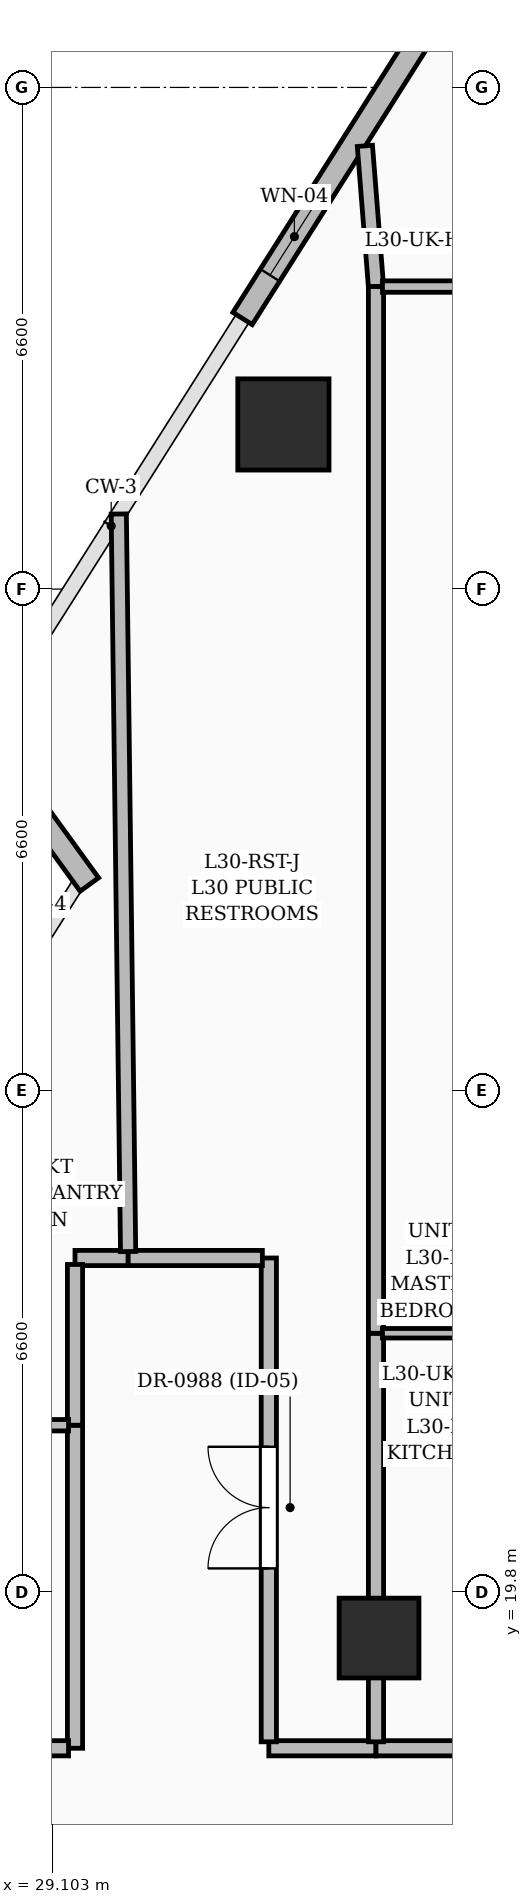
"""IFC4 building model, lengths in metres.
Left out: names, types, materials, properties, quantities, classifications, styles, units other than length and angle.
Written with IfcOpenShell. Run it as: python <this file> out.ifc"""

import sys

from ifc_helpers import new_model, si_unit, direction, frame, frame_2d, origin, origin_2d, place, context, subcontext, project, spatial, rectangle, extrude, element, fill, save


model = new_model("IFC4")
c1 = context("Model", 3, precision=1e-05, world=origin(), true_north=direction((0.0, 1.0)))
c2 = subcontext(c1, "Body", "Model", "MODEL_VIEW")
j1 = project(units=[si_unit("LENGTHUNIT", "METRE"), si_unit("PLANEANGLEUNIT", "RADIAN")], contexts=[c1])
p1 = place(None, origin())
s1 = spatial("IfcSite", under=j1, at=p1, CompositionType="ELEMENT")
p2 = place(p1, origin())
s2 = spatial("IfcBuilding", under=s1, at=p2, CompositionType="ELEMENT")
p3 = place(p2, frame((0.0, 0.0, 121.2)))
s3 = spatial("IfcBuildingStorey", under=s2, at=p3, CompositionType="ELEMENT", Elevation=121.2)
p4 = place(p3, frame((33.4, 19.2, 0.0), z_axis=(0.0, 0.0, 1.0), x_axis=(1.0, 0.0, 0.0)))
e1 = element("IfcColumn", 1, at=p4, inside=s3, PredefinedType="COLUMN", context=c2, shape_type="SweptSolid", body=[
    extrude(rectangle(XDim=1.05, YDim=1.05, at=origin_2d()), origin(), (0.0, 0.0, 1.0), 3.6),
])
p5 = place(p3, frame((32.142, 35.166, 0.0), z_axis=(0.0, 0.0, 1.0), x_axis=(1.0, 0.0, 0.0)))
e2 = element("IfcColumn", 2, at=p5, inside=s3, PredefinedType="COLUMN", context=c2, shape_type="SweptSolid", body=[
    extrude(rectangle(XDim=1.2, YDim=1.2, at=origin_2d()), origin(), (0.0, 0.0, 1.0), 3.6),
])
p6 = place(p3, frame((29.589, 29.114, 0.0), z_axis=(0.0, 0.0, 1.0), x_axis=(-0.587214315037, 0.809431496926, 0.0)))
e3 = element("IfcWall", 3, at=p6, inside=s3, PredefinedType="SOLIDWALL", context=c2, shape_type="SweptSolid", body=[
    extrude(rectangle(XDim=2.594, YDim=0.3, at=frame_2d((1.297, 0.0))), origin(), (0.0, 0.0, 1.0), 2.575),
])
p7 = place(p3, frame((31.604, 36.56, 0.0), z_axis=(0.0, 0.0, 1.0), x_axis=(0.53489387979, 0.844919249019, 0.0)))
e4 = element("IfcWall", 4, at=p7, inside=s3, PredefinedType="SOLIDWALL", context=c2, shape_type="SweptSolid", body=[
    extrude(rectangle(XDim=6.462, YDim=0.3, at=frame_2d((3.231, 0.0))), origin(), (0.0, 0.0, 1.0), 3.35),
])
p8 = place(p7, frame((0.675, 0.0, 0.8)))
e5 = element("IfcOpeningElement", 5, at=p8, cuts=e4, PredefinedType="OPENING", context=c2, shape_type="SweptSolid", body=[
    extrude(rectangle(XDim=1.2, YDim=1.8, at=frame_2d((0.6, 0.9))), frame((0.0, 0.16, 0.0), z_axis=(0.0, -1.0, 0.0), x_axis=(1.0, 0.0, 0.0)), (0.0, 0.0, 1.0), 0.32),
])
p9 = place(p3, frame((29.4, 22.0, 0.0), z_axis=(0.0, 0.0, 1.0), x_axis=(0.0, -1.0, 0.0)))
e6 = element("IfcWall", 6, at=p9, inside=s3, PredefinedType="PARTITIONING", context=c2, shape_type="SweptSolid", body=[
    extrude(rectangle(XDim=4.25, YDim=0.2, at=frame_2d((2.125, 0.0))), origin(), (0.0, 0.0, 1.0), 2.787),
])
p10 = place(p3, frame((29.315, 17.75, 0.0), z_axis=(0.0, 0.0, 1.0), x_axis=(-1.0, 0.0, 0.0)))
e7 = element("IfcWall", 7, at=p10, inside=s3, PredefinedType="PARTITIONING", context=c2, shape_type="SweptSolid", body=[
    extrude(rectangle(XDim=3.645, YDim=0.2, at=frame_2d((1.823, 0.0))), origin(), (0.0, 0.0, 1.0), 2.787),
])
p11 = place(p3, frame((30.1, 24.2, 0.0), z_axis=(0.0, 0.0, 1.0), x_axis=(-1.0, 0.0, 0.0)))
e8 = element("IfcWall", 8, at=p11, inside=s3, PredefinedType="PARTITIONING", context=c2, shape_type="SweptSolid", body=[
    extrude(rectangle(XDim=0.7, YDim=0.2, at=frame_2d((0.35, 0.0))), origin(), (0.0, 0.0, 1.0), 3.35),
])
p12 = place(p3, frame((29.4, 24.115, 0.0), z_axis=(0.0, 0.0, 1.0), x_axis=(0.0, -1.0, 0.0)))
e9 = element("IfcWall", 9, at=p12, inside=s3, PredefinedType="PARTITIONING", context=c2, shape_type="SweptSolid", body=[
    extrude(rectangle(XDim=2.115, YDim=0.2, at=frame_2d((1.058, 0.0))), origin(), (0.0, 0.0, 1.0), 2.372),
])
p13 = place(p3, frame((33.36, 17.75, 0.0), z_axis=(0.0, 0.0, 1.0), x_axis=(-1.0, 0.0, 0.0)))
e10 = element("IfcWall", 10, at=p13, inside=s3, PredefinedType="PARTITIONING", context=c2, shape_type="SweptSolid", body=[
    extrude(rectangle(XDim=1.41, YDim=0.2, at=frame_2d((0.705, 0.0))), origin(), (0.0, 0.0, 1.0), 3.35),
])
p14 = place(p3, frame((31.95, 17.835, 0.0), z_axis=(0.0, 0.0, 1.0), x_axis=(0.0, 1.0, 0.0)))
e11 = element("IfcWall", 11, at=p14, inside=s3, PredefinedType="PARTITIONING", context=c2, shape_type="SweptSolid", body=[
    extrude(rectangle(XDim=6.365, YDim=0.2, at=frame_2d((3.183, 0.0))), origin(), (0.0, 0.0, 1.0), 2.372),
])
p15 = place(p14, frame((2.281, 0.0, 0.0)))
e12 = element("IfcOpeningElement", 12, at=p15, cuts=e11, PredefinedType="OPENING", context=c2, shape_type="SweptSolid", body=[
    extrude(rectangle(XDim=1.6, YDim=2.3, at=frame_2d((0.8, 1.15))), frame((0.0, 0.11, 0.0), z_axis=(0.0, -1.0, 0.0), x_axis=(1.0, 0.0, 0.0)), (0.0, 0.0, 1.0), 0.22),
])
p16 = place(p3, frame((31.865, 24.2, 0.0), z_axis=(0.0, 0.0, 1.0), x_axis=(-1.0, 0.0, 0.0)))
e13 = element("IfcWall", 13, at=p16, inside=s3, PredefinedType="PARTITIONING", context=c2, shape_type="SweptSolid", body=[
    extrude(rectangle(XDim=1.765, YDim=0.2, at=frame_2d((0.882, 0.0))), origin(), (0.0, 0.0, 1.0), 2.787),
])
p17 = place(p3, frame((35.01, 17.75, 0.0), z_axis=(0.0, 0.0, 1.0), x_axis=(-1.0, 0.0, 0.0)))
e14 = element("IfcWall", 14, at=p17, inside=s3, PredefinedType="PARTITIONING", context=c2, shape_type="SweptSolid", body=[
    extrude(rectangle(XDim=1.65, YDim=0.2, at=frame_2d((0.825, 0.0))), origin(), (0.0, 0.0, 1.0), 2.436),
])
p18 = place(p3, frame((29.315, 22.0, 0.0), z_axis=(0.0, 0.0, 1.0), x_axis=(-1.0, 0.0, 0.0)))
e15 = element("IfcWall", 15, at=p18, inside=s3, PredefinedType="PARTITIONING", context=c2, shape_type="SweptSolid", body=[
    extrude(rectangle(XDim=3.585, YDim=0.15, at=frame_2d((1.792, 0.0))), origin(), (0.0, 0.0, 1.0), 2.787),
])
p19 = place(p3, frame((30.099, 24.285, 0.0), z_axis=(0.0, 0.0, 1.0), x_axis=(-0.012654984929, 0.999919922472, 0.0)))
e16 = element("IfcWall", 16, at=p19, inside=s3, PredefinedType="PARTITIONING", context=c2, shape_type="SweptSolid", body=[
    extrude(rectangle(XDim=9.704, YDim=0.2, at=frame_2d((4.852, 0.0))), origin(), (0.0, 0.0, 1.0), 2.57),
])
p20 = place(p3, frame((33.36, 36.98, 0.0), z_axis=(0.0, 0.0, 1.0), x_axis=(-0.07862683496, 0.99690411817, 0.0)))
e17 = element("IfcWall", 17, at=p20, inside=s3, PredefinedType="PARTITIONING", context=c2, shape_type="SweptSolid", body=[
    extrude(rectangle(XDim=1.857, YDim=0.2, at=frame_2d((0.928, 0.0))), origin(), (0.0, 0.0, 1.0), 3.35),
])
p21 = place(p3, frame((33.36, 17.835, 0.0), z_axis=(0.0, 0.0, 1.0), x_axis=(0.0, 1.0, 0.0)))
e18 = element("IfcWall", 18, at=p21, inside=s3, PredefinedType="PARTITIONING", context=c2, shape_type="SweptSolid", body=[
    extrude(rectangle(XDim=5.375, YDim=0.2, at=frame_2d((2.688, 0.0))), origin(), (0.0, 0.0, 1.0), 2.436),
])
p22 = place(p3, frame((33.36, 23.21, 0.0), z_axis=(0.0, 0.0, 1.0), x_axis=(0.0, 1.0, 0.0)))
e19 = element("IfcWall", 19, at=p22, inside=s3, PredefinedType="PARTITIONING", context=c2, shape_type="SweptSolid", body=[
    extrude(rectangle(XDim=13.77, YDim=0.2, at=frame_2d((6.885, 0.0))), origin(), (0.0, 0.0, 1.0), 2.372),
])
p23 = place(p3, frame((33.445, 36.98, 0.0), z_axis=(0.0, 0.0, 1.0), x_axis=(1.0, 0.0, 0.0)))
e20 = element("IfcWall", 20, at=p23, inside=s3, PredefinedType="PARTITIONING", context=c2, shape_type="SweptSolid", body=[
    extrude(rectangle(XDim=1.505, YDim=0.15, at=frame_2d((0.752, 0.0))), origin(), (0.0, 0.0, 1.0), 3.35),
])
p24 = place(p3, frame((34.962, 23.21, 0.0), z_axis=(0.0, 0.0, 1.0), x_axis=(-1.0, 0.0, 0.0)))
e21 = element("IfcWall", 21, at=p24, inside=s3, PredefinedType="PARTITIONING", context=c2, shape_type="SweptSolid", body=[
    extrude(rectangle(XDim=1.517, YDim=0.125, at=frame_2d((0.759, 0.0))), origin(), (0.0, 0.0, 1.0), 3.35),
])
p25 = place(p8, origin())
e22 = element("IfcWindow", 22, at=p25, inside=s3, PartitioningType="SINGLE_PANEL", PredefinedType="WINDOW", context=c2, shape_type="SweptSolid", body=[
    extrude(rectangle(XDim=1.2, YDim=1.8, at=frame_2d((0.6, 0.9))), frame((0.0, 0.03, 0.0), z_axis=(0.0, -1.0, 0.0), x_axis=(1.0, 0.0, 0.0)), (0.0, 0.0, 1.0), 0.06),
])
fill(e5, e22)
p26 = place(p15, origin())
e23 = element("IfcDoor", 23, at=p26, inside=s3, OperationType="DOUBLE_DOOR_SINGLE_SWING", PredefinedType="DOOR", context=c2, shape_type="SweptSolid", body=[
    extrude(rectangle(XDim=1.6, YDim=2.3, at=frame_2d((0.8, 1.15))), frame((0.0, 0.025, 0.0), z_axis=(0.0, -1.0, 0.0), x_axis=(1.0, 0.0, 0.0)), (0.0, 0.0, 1.0), 0.05),
])
fill(e12, e23)
save(model, sys.argv[1])
